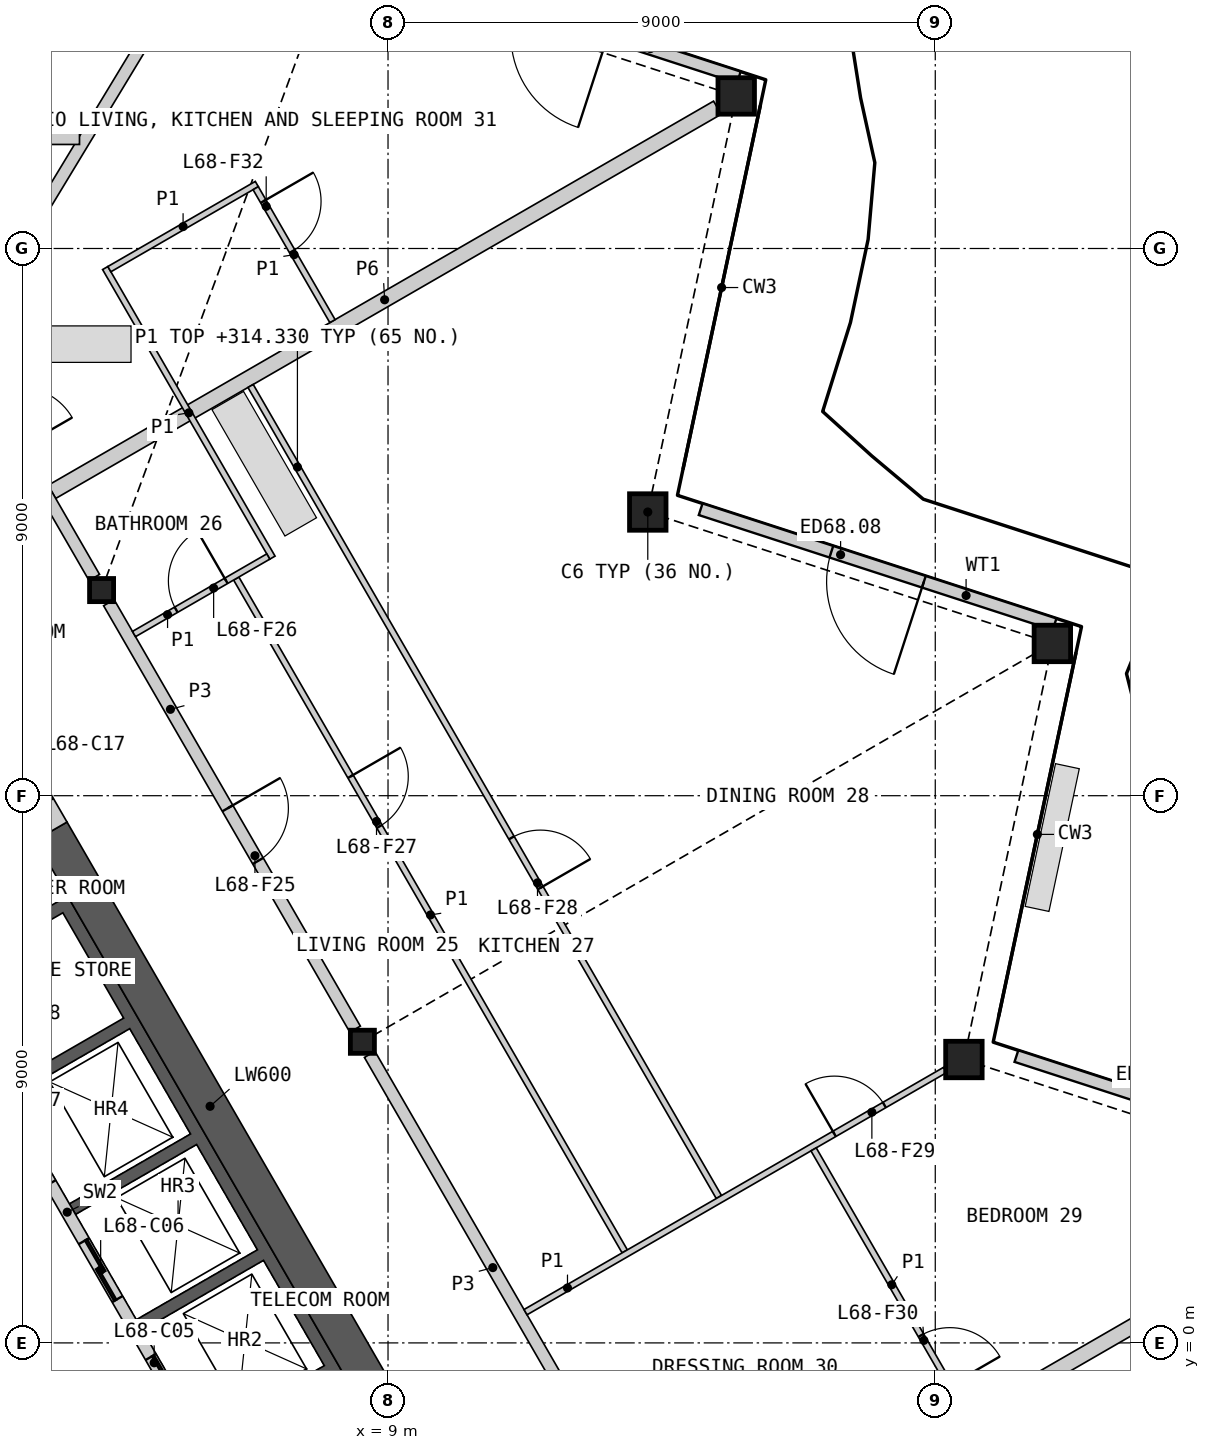
"""IFC4 building model, lengths in metres.
Left out: names, types, materials, properties, quantities, classifications, styles, units other than length and angle.
Written with IfcOpenShell. Run it as: python <this file> out.ifc"""

import sys

from ifc_helpers import new_model, si_unit, direction, frame, frame_2d, origin, origin_2d, place, context, subcontext, project, spatial, polyline, rectangle, hollow_rectangle, i_section, outline, extrude, element, fill, save


model = new_model("IFC4")
c1 = context("Model", 3, precision=1e-05, world=origin(), true_north=direction((0.0, 1.0)))
c2 = subcontext(c1, "Body", "Model", "MODEL_VIEW")
j1 = project(units=[si_unit("LENGTHUNIT", "METRE"), si_unit("PLANEANGLEUNIT", "RADIAN")], contexts=[c1])
p1 = place(None, origin())
s1 = spatial("IfcSite", under=j1, at=p1, CompositionType="ELEMENT")
p2 = place(p1, origin())
s2 = spatial("IfcBuilding", under=s1, at=p2, CompositionType="ELEMENT")
p3 = place(p2, frame((0.0, 0.0, 312.0)))
s3 = spatial("IfcBuildingStorey", under=s2, at=p3, CompositionType="ELEMENT", Elevation=312.0)
for number, where, z_axis, x_axis in (
    (1, (18.471, 4.661, 0.0), (0.0, 0.0, 1.0), (1.0, 0.0, 0.0)),
    (2, (19.926, 11.504, 0.0), (0.0, 0.0, 1.0), (1.0, 0.0, 0.0)),
    (3, (13.272, 13.666, 0.0), (0.0, 0.0, 1.0), (1.0, 0.0, 0.0)),
    (4, (14.727, 20.509, 0.0), (0.0, 0.0, 1.0), (1.0, 0.0, 0.0)),
):
    element("IfcColumn", number, at=place(p3, frame(where, z_axis=z_axis, x_axis=x_axis)), inside=s3, PredefinedType="COLUMN", context=c2, shape_type="SweptSolid", body=[
        extrude(hollow_rectangle(XDim=0.6, YDim=0.6, WallThickness=0.04, at=origin_2d()), origin(), (0.0, 0.0, 1.0), 3.4),
    ])
for number, where, z_axis, x_axis in (
    (5, (8.578, 4.953, 0.0), (0.0, 0.0, 1.0), (1.0, 0.0, 0.0)),
    (6, (4.289, 12.382, 0.0), (0.0, 0.0, 1.0), (1.0, 0.0, 0.0)),
):
    element("IfcColumn", number, at=place(p3, frame(where, z_axis=z_axis, x_axis=x_axis)), inside=s3, PredefinedType="COLUMN", context=c2, shape_type="SweptSolid", body=[
        extrude(i_section(OverallWidth=0.396, OverallDepth=0.381, WebThickness=0.019, FlangeThickness=0.03, at=origin_2d()), origin(), (0.0, 0.0, 1.0), 3.4),
    ])
p4 = place(p3, frame((25.155, 2.826, 0.0), z_axis=(0.0, 0.0, 1.0), x_axis=(-0.951053709789, 0.309025631781, 0.0)))
e7 = element("IfcWall", 7, at=p4, inside=s3, PredefinedType="SOLIDWALL", context=c2, shape_type="SweptSolid", body=[
    extrude(rectangle(XDim=6.12, YDim=0.2, at=frame_2d((3.06, 0.0))), origin(), (0.0, 0.0, 1.0), 2.488),
])
p5 = place(p4, frame((2.26, 0.0, 0.0)))
e8 = element("IfcOpeningElement", 8, at=p5, cuts=e7, PredefinedType="OPENING", context=c2, shape_type="SweptSolid", body=[
    extrude(rectangle(XDim=1.6, YDim=2.25, at=frame_2d((0.8, 1.125))), frame((0.0, 0.11, 0.0), z_axis=(0.0, -1.0, 0.0), x_axis=(1.0, 0.0, 0.0)), (0.0, 0.0, 1.0), 0.22),
])
p6 = place(p3, frame((19.962, 11.82, 0.0), z_axis=(0.0, 0.0, 1.0), x_axis=(-0.951053709789, 0.309025631781, 0.0)))
e9 = element("IfcWall", 9, at=p6, inside=s3, PredefinedType="SOLIDWALL", context=c2, shape_type="SweptSolid", body=[
    extrude(rectangle(XDim=6.12, YDim=0.2, at=frame_2d((3.06, 0.0))), origin(), (0.0, 0.0, 1.0), 2.488),
])
p7 = place(p6, frame((2.26, 0.0, 0.0)))
e10 = element("IfcOpeningElement", 10, at=p7, cuts=e9, PredefinedType="OPENING", context=c2, shape_type="SweptSolid", body=[
    extrude(rectangle(XDim=1.6, YDim=2.25, at=frame_2d((0.8, 1.125))), frame((0.0, 0.11, 0.0), z_axis=(0.0, -1.0, 0.0), x_axis=(1.0, 0.0, 0.0)), (0.0, 0.0, 1.0), 0.22),
])
p8 = place(p3, frame((14.769, 20.814, 0.0), z_axis=(0.0, 0.0, 1.0), x_axis=(-0.951069243123, 0.308977822483, 0.0)))
e11 = element("IfcWall", 11, at=p8, inside=s3, PredefinedType="SOLIDWALL", context=c2, shape_type="SweptSolid", body=[
    extrude(rectangle(XDim=6.12, YDim=0.2, at=frame_2d((3.06, 0.0))), origin(), (0.0, 0.0, 1.0), 2.488),
])
p9 = place(p8, frame((2.26, 0.0, 0.0)))
e12 = element("IfcOpeningElement", 12, at=p9, cuts=e11, PredefinedType="OPENING", context=c2, shape_type="SweptSolid", body=[
    extrude(rectangle(XDim=1.6, YDim=2.25, at=frame_2d((0.8, 1.125))), frame((0.0, 0.11, 0.0), z_axis=(0.0, -1.0, 0.0), x_axis=(1.0, 0.0, 0.0)), (0.0, 0.0, 1.0), 0.22),
])
p10 = place(p3, origin())
e13 = element("IfcWall", 13, at=p10, inside=s3, PredefinedType="SHEAR", context=c2, shape_type="SweptSolid", body=[
    extrude(outline(polyline([(1.561, 6.097), (3.731, 7.35), (8.231, -0.444), (6.061, -1.697), (5.96, -1.524), (7.952, -0.374), (6.952, 1.358), (4.96, 0.208), (4.861, 0.381), (6.852, 1.531), (5.852, 3.263), (3.861, 2.113), (3.76, 2.287), (5.752, 3.437), (4.752, 5.169), (2.76, 4.019), (2.66, 4.192), (4.652, 5.342), (3.652, 7.074), (1.66, 5.924), (1.561, 6.097)])), origin(), (0.0, 0.0, 1.0), 3.1),
])
p11 = place(p3, frame((5.817, -1.476, 0.0), z_axis=(0.0, 0.0, 1.0), x_axis=(-0.500002616675, 0.866023893041, 0.0)))
e14 = element("IfcWall", 14, at=p11, inside=s3, PredefinedType="SOLIDWALL", context=c2, shape_type="SweptSolid", body=[
    extrude(rectangle(XDim=8.373, YDim=0.2, at=frame_2d((4.187, 0.0))), origin(), (0.0, 0.0, 1.0), 3.1),
])
p12 = place(p11, frame((0.337, 0.0, 0.0)))
e15 = element("IfcOpeningElement", 15, at=p12, cuts=e14, PredefinedType="OPENING", context=c2, shape_type="SweptSolid", body=[
    extrude(rectangle(XDim=1.1, YDim=2.1, at=frame_2d((0.55, 1.05))), frame((0.0, 0.11, 0.0), z_axis=(0.0, -1.0, 0.0), x_axis=(1.0, 0.0, 0.0)), (0.0, 0.0, 1.0), 0.22),
])
p13 = place(p11, frame((2.537, 0.0, 0.0)))
e16 = element("IfcOpeningElement", 16, at=p13, cuts=e14, PredefinedType="OPENING", context=c2, shape_type="SweptSolid", body=[
    extrude(rectangle(XDim=1.1, YDim=2.1, at=frame_2d((0.55, 1.05))), frame((0.0, 0.11, 0.0), z_axis=(0.0, -1.0, 0.0), x_axis=(1.0, 0.0, 0.0)), (0.0, 0.0, 1.0), 0.22),
])
p14 = place(p11, frame((4.737, 0.0, 0.0)))
e17 = element("IfcOpeningElement", 17, at=p14, cuts=e14, PredefinedType="OPENING", context=c2, shape_type="SweptSolid", body=[
    extrude(rectangle(XDim=1.1, YDim=2.1, at=frame_2d((0.55, 1.05))), frame((0.0, 0.11, 0.0), z_axis=(0.0, -1.0, 0.0), x_axis=(1.0, 0.0, 0.0)), (0.0, 0.0, 1.0), 0.22),
])
p15 = place(p11, frame((7.037, 0.0, 0.0)))
e18 = element("IfcOpeningElement", 18, at=p15, cuts=e14, PredefinedType="OPENING", context=c2, shape_type="SweptSolid", body=[
    extrude(rectangle(XDim=0.9, YDim=2.1, at=frame_2d((0.45, 1.05))), frame((0.0, 0.11, 0.0), z_axis=(0.0, -1.0, 0.0), x_axis=(1.0, 0.0, 0.0)), (0.0, 0.0, 1.0), 0.22),
])
p16 = place(p3, frame((8.686, -0.634, 0.0), z_axis=(0.0, 0.0, 1.0), x_axis=(-0.50001836461, 0.866014800712, 0.0)))
e19 = element("IfcWall", 19, at=p16, inside=s3, PredefinedType="SHEAR", context=c2, shape_type="SweptSolid", body=[
    extrude(rectangle(XDim=10.451, YDim=0.6, at=frame_2d((5.225, 0.0))), origin(), (0.0, 0.0, 1.0), 3.1),
])
p17 = place(p3, frame((3.461, 8.417, 0.0), z_axis=(0.0, 0.0, 1.0), x_axis=(-0.499946605688, 0.86605622881, 0.0)))
e20 = element("IfcWall", 20, at=p17, inside=s3, PredefinedType="SHEAR", context=c2, shape_type="SweptSolid", body=[
    extrude(rectangle(XDim=2.2, YDim=0.6, at=frame_2d((1.1, 0.0))), origin(), (0.0, 0.0, 1.0), 3.1),
])
p18 = place(p17, frame((0.45, 0.0, 0.0)))
e21 = element("IfcOpeningElement", 21, at=p18, cuts=e20, PredefinedType="OPENING", context=c2, shape_type="SweptSolid", body=[
    extrude(rectangle(XDim=1.0, YDim=2.1, at=frame_2d((0.5, 1.05))), frame((0.0, 0.31, 0.0), z_axis=(0.0, -1.0, 0.0), x_axis=(1.0, 0.0, 0.0)), (0.0, 0.0, 1.0), 0.62),
])
p19 = place(p3, frame((3.472, 13.997, 0.0), z_axis=(0.0, 0.0, 1.0), x_axis=(0.866029233976, 0.499993365855, 0.0)))
e22 = element("IfcWall", 22, at=p19, inside=s3, PredefinedType="PARTITIONING", context=c2, shape_type="SweptSolid", body=[
    extrude(rectangle(XDim=12.637, YDim=0.25, at=frame_2d((6.319, 0.0))), origin(), (0.0, 0.0, 1.0), 2.33),
])
p20 = place(p3, frame((8.698, 4.745, 0.0), z_axis=(0.0, 0.0, 1.0), x_axis=(0.499984266882, -0.866034487114, 0.0)))
e23 = element("IfcWall", 23, at=p20, inside=s3, PredefinedType="PARTITIONING", context=c2, shape_type="SweptSolid", body=[
    extrude(rectangle(XDim=8.099, YDim=0.2, at=frame_2d((4.049, 0.0))), origin(), (0.0, 0.0, 1.0), 3.1),
])
p21 = place(p3, frame((4.409, 12.174, 0.0), z_axis=(0.0, 0.0, 1.0), x_axis=(0.499984266882, -0.866034487114, 0.0)))
e24 = element("IfcWall", 24, at=p21, inside=s3, PredefinedType="PARTITIONING", context=c2, shape_type="SweptSolid", body=[
    extrude(rectangle(XDim=8.099, YDim=0.2, at=frame_2d((4.049, 0.0))), origin(), (0.0, 0.0, 1.0), 3.1),
])
p22 = place(p21, frame((3.905, 0.0, 0.0)))
e25 = element("IfcOpeningElement", 25, at=p22, cuts=e24, PredefinedType="OPENING", context=c2, shape_type="SweptSolid", body=[
    extrude(rectangle(XDim=1.0, YDim=2.1, at=frame_2d((0.5, 1.05))), frame((0.0, 0.11, 0.0), z_axis=(0.0, -1.0, 0.0), x_axis=(1.0, 0.0, 0.0)), (0.0, 0.0, 1.0), 0.22),
])
p23 = place(p3, frame((18.454, -1.338, 0.0), z_axis=(0.0, 0.0, 1.0), x_axis=(0.866023407002, 0.500003458512, 0.0)))
e26 = element("IfcWall", 26, at=p23, inside=s3, PredefinedType="PARTITIONING", context=c2, shape_type="SweptSolid", body=[
    extrude(rectangle(XDim=7.345, YDim=0.25, at=frame_2d((3.673, 0.0))), origin(), (0.0, 0.0, 1.0), 2.33),
])
p24 = place(p3, frame((1.913, 16.498, 0.0), z_axis=(0.0, 0.0, 1.0), x_axis=(0.499950370306, -0.866054055606, 0.0)))
e27 = element("IfcWall", 27, at=p24, inside=s3, PredefinedType="PARTITIONING", context=c2, shape_type="SweptSolid", body=[
    extrude(rectangle(XDim=4.513, YDim=0.2, at=frame_2d((2.256, 0.0))), origin(), (0.0, 0.0, 1.0), 3.1),
])
p25 = place(p24, frame((1.053, 0.0, 0.0)))
e28 = element("IfcOpeningElement", 28, at=p25, cuts=e27, PredefinedType="OPENING", context=c2, shape_type="SweptSolid", body=[
    extrude(rectangle(XDim=1.0, YDim=2.1, at=frame_2d((0.5, 1.05))), frame((0.0, 0.11, 0.0), z_axis=(0.0, -1.0, 0.0), x_axis=(1.0, 0.0, 0.0)), (0.0, 0.0, 1.0), 0.22),
])
p26 = place(p3, frame((2.015, 16.497, 0.0), z_axis=(0.0, 0.0, 1.0), x_axis=(0.517779253395, 0.855514257482, 0.0)))
e29 = element("IfcWall", 29, at=p26, inside=s3, PredefinedType="PARTITIONING", context=c2, shape_type="SweptSolid", body=[
    extrude(rectangle(XDim=14.854, YDim=0.2, at=frame_2d((7.427, 0.0))), origin(), (0.0, 0.0, 1.0), 2.33),
])
p27 = place(p3, frame((0.208, 19.811, 0.0), z_axis=(0.0, 0.0, 1.0), x_axis=(1.0, 0.0, 0.0)))
e30 = element("IfcWall", 30, at=p27, inside=s3, PredefinedType="PARTITIONING", context=c2, shape_type="SweptSolid", body=[
    extrude(rectangle(XDim=3.718, YDim=0.2, at=frame_2d((1.859, 0.0))), origin(), (0.0, 0.0, 1.0), 2.33),
])
p28 = place(p3, frame((6.74, 15.739, 0.0), z_axis=(0.0, 0.0, 1.0), x_axis=(0.499995022685, -0.86602827742, 0.0)))
e31 = element("IfcWall", 31, at=p28, inside=s3, PredefinedType="PARTITIONING", context=c2, shape_type="SweptSolid", body=[
    extrude(rectangle(XDim=15.404, YDim=0.1, at=frame_2d((7.702, 0.0))), origin(), (0.0, 0.0, 1.0), 2.33),
])
p29 = place(p28, frame((8.582, 0.0, 0.0)))
e32 = element("IfcOpeningElement", 32, at=p29, cuts=e31, PredefinedType="OPENING", context=c2, shape_type="SweptSolid", body=[
    extrude(rectangle(XDim=0.95, YDim=2.1, at=frame_2d((0.475, 1.05))), frame((0.0, 0.06, 0.0), z_axis=(0.0, -1.0, 0.0), x_axis=(1.0, 0.0, 0.0)), (0.0, 0.0, 1.0), 0.12),
])
p30 = place(p3, frame((6.504, 12.572, 0.0), z_axis=(0.0, 0.0, 1.0), x_axis=(0.499998094172, -0.866026504112, 0.0)))
e33 = element("IfcWall", 33, at=p30, inside=s3, PredefinedType="PARTITIONING", context=c2, shape_type="SweptSolid", body=[
    extrude(rectangle(XDim=12.778, YDim=0.1, at=frame_2d((6.389, 0.0))), origin(), (0.0, 0.0, 1.0), 2.33),
])
p31 = place(p30, frame((3.759, 0.0, 0.0)))
e34 = element("IfcOpeningElement", 34, at=p31, cuts=e33, PredefinedType="OPENING", context=c2, shape_type="SweptSolid", body=[
    extrude(rectangle(XDim=0.95, YDim=2.1, at=frame_2d((0.475, 1.05))), frame((0.0, 0.06, 0.0), z_axis=(0.0, -1.0, 0.0), x_axis=(1.0, 0.0, 0.0)), (0.0, 0.0, 1.0), 0.12),
])
p32 = place(p3, frame((11.261, 0.506, 0.0), z_axis=(0.0, 0.0, 1.0), x_axis=(0.866024323732, 0.500001870701, 0.0)))
e35 = element("IfcWall", 35, at=p32, inside=s3, PredefinedType="PARTITIONING", context=c2, shape_type="SweptSolid", body=[
    extrude(rectangle(XDim=7.967, YDim=0.1, at=frame_2d((3.983, 0.0))), origin(), (0.0, 0.0, 1.0), 2.33),
])
p33 = place(p32, frame((5.865, 0.0, 0.0)))
e36 = element("IfcOpeningElement", 36, at=p33, cuts=e35, PredefinedType="OPENING", context=c2, shape_type="SweptSolid", body=[
    extrude(rectangle(XDim=0.95, YDim=2.1, at=frame_2d((0.475, 1.05))), frame((0.0, 0.06, 0.0), z_axis=(0.0, -1.0, 0.0), x_axis=(1.0, 0.0, 0.0)), (0.0, 0.0, 1.0), 0.12),
])
p34 = place(p3, frame((4.349, 17.679, 0.0), z_axis=(0.0, 0.0, 1.0), x_axis=(0.49997732567, -0.866038494419, 0.0)))
e37 = element("IfcWall", 37, at=p34, inside=s3, PredefinedType="PARTITIONING", context=c2, shape_type="SweptSolid", body=[
    extrude(rectangle(XDim=5.5, YDim=0.1, at=frame_2d((2.75, 0.0))), origin(), (0.0, 0.0, 1.0), 2.33),
])
p35 = place(p3, frame((15.999, 3.183, 0.0), z_axis=(0.0, 0.0, 1.0), x_axis=(0.500014207086, -0.866017201164, 0.0)))
e38 = element("IfcWall", 38, at=p35, inside=s3, PredefinedType="PARTITIONING", context=c2, shape_type="SweptSolid", body=[
    extrude(rectangle(XDim=5.143, YDim=0.1, at=frame_2d((2.571, 0.0))), origin(), (0.0, 0.0, 1.0), 2.33),
])
p36 = place(p35, frame((3.532, 0.0, 0.0)))
e39 = element("IfcOpeningElement", 39, at=p36, cuts=e38, PredefinedType="OPENING", context=c2, shape_type="SweptSolid", body=[
    extrude(rectangle(XDim=0.95, YDim=2.1, at=frame_2d((0.475, 1.05))), frame((0.0, 0.06, 0.0), z_axis=(0.0, -1.0, 0.0), x_axis=(1.0, 0.0, 0.0)), (0.0, 0.0, 1.0), 0.12),
])
p37 = place(p3, frame((4.417, 17.66, 0.0), z_axis=(0.0, 0.0, 1.0), x_axis=(0.866034573852, 0.49998411664, 0.0)))
e40 = element("IfcWall", 40, at=p37, inside=s3, PredefinedType="PARTITIONING", context=c2, shape_type="SweptSolid", body=[
    extrude(rectangle(XDim=2.8, YDim=0.1, at=frame_2d((1.4, 0.0))), origin(), (0.0, 0.0, 1.0), 2.33),
])
p38 = place(p3, frame((6.824, 18.992, 0.0), z_axis=(0.0, 0.0, 1.0), x_axis=(0.50001820224, -0.866014894461, 0.0)))
e41 = element("IfcWall", 41, at=p38, inside=s3, PredefinedType="PARTITIONING", context=c2, shape_type="SweptSolid", body=[
    extrude(rectangle(XDim=2.525, YDim=0.1, at=frame_2d((1.262, 0.0))), origin(), (0.0, 0.0, 1.0), 2.33),
])
p39 = place(p38, frame((0.25, 0.0, 0.0)))
e42 = element("IfcOpeningElement", 42, at=p39, cuts=e41, PredefinedType="OPENING", context=c2, shape_type="SweptSolid", body=[
    extrude(rectangle(XDim=0.95, YDim=2.1, at=frame_2d((0.475, 1.05))), frame((0.0, 0.06, 0.0), z_axis=(0.0, -1.0, 0.0), x_axis=(1.0, 0.0, 0.0)), (0.0, 0.0, 1.0), 0.12),
])
p40 = place(p3, frame((4.822, 11.659, 0.0), z_axis=(0.0, 0.0, 1.0), x_axis=(0.866030925526, 0.499990435942, 0.0)))
e43 = element("IfcWall", 43, at=p40, inside=s3, PredefinedType="PARTITIONING", context=c2, shape_type="SweptSolid", body=[
    extrude(rectangle(XDim=2.55, YDim=0.1, at=frame_2d((1.275, 0.0))), origin(), (0.0, 0.0, 1.0), 2.33),
])
p41 = place(p40, frame((0.8, 0.0, 0.0)))
e44 = element("IfcOpeningElement", 44, at=p41, cuts=e43, PredefinedType="OPENING", context=c2, shape_type="SweptSolid", body=[
    extrude(rectangle(XDim=0.95, YDim=2.1, at=frame_2d((0.475, 1.05))), frame((0.0, 0.06, 0.0), z_axis=(0.0, -1.0, 0.0), x_axis=(1.0, 0.0, 0.0)), (0.0, 0.0, 1.0), 0.12),
])
p42 = place(p7, origin())
e45 = element("IfcDoor", 45, at=p42, inside=s3, OperationType="DOUBLE_DOOR_SINGLE_SWING", PredefinedType="DOOR", context=c2, shape_type="SweptSolid", body=[
    extrude(rectangle(XDim=1.6, YDim=2.25, at=frame_2d((0.8, 1.125))), frame((0.0, 0.025, 0.0), z_axis=(0.0, -1.0, 0.0), x_axis=(1.0, 0.0, 0.0)), (0.0, 0.0, 1.0), 0.05),
])
fill(e10, e45)
p43 = place(p12, origin())
e46 = element("IfcDoor", 46, at=p43, inside=s3, OperationType="SLIDING_TO_LEFT", PredefinedType="DOOR", context=c2, shape_type="SweptSolid", body=[
    extrude(rectangle(XDim=1.1, YDim=2.1, at=frame_2d((0.55, 1.05))), frame((0.0, 0.025, 0.0), z_axis=(0.0, -1.0, 0.0), x_axis=(1.0, 0.0, 0.0)), (0.0, 0.0, 1.0), 0.05),
])
fill(e15, e46)
p44 = place(p13, origin())
e47 = element("IfcDoor", 47, at=p44, inside=s3, OperationType="SLIDING_TO_LEFT", PredefinedType="DOOR", context=c2, shape_type="SweptSolid", body=[
    extrude(rectangle(XDim=1.1, YDim=2.1, at=frame_2d((0.55, 1.05))), frame((0.0, 0.025, 0.0), z_axis=(0.0, -1.0, 0.0), x_axis=(1.0, 0.0, 0.0)), (0.0, 0.0, 1.0), 0.05),
])
fill(e16, e47)
p45 = place(p22, origin())
e48 = element("IfcDoor", 48, at=p45, inside=s3, OperationType="SINGLE_SWING_LEFT", PredefinedType="DOOR", context=c2, shape_type="SweptSolid", body=[
    extrude(rectangle(XDim=1.0, YDim=2.1, at=frame_2d((0.5, 1.05))), frame((0.0, 0.025, 0.0), z_axis=(0.0, -1.0, 0.0), x_axis=(1.0, 0.0, 0.0)), (0.0, 0.0, 1.0), 0.05),
])
fill(e25, e48)
p46 = place(p41, origin())
e49 = element("IfcDoor", 49, at=p46, inside=s3, OperationType="SINGLE_SWING_RIGHT", PredefinedType="DOOR", context=c2, shape_type="SweptSolid", body=[
    extrude(rectangle(XDim=0.95, YDim=2.1, at=frame_2d((0.475, 1.05))), frame((0.0, 0.025, 0.0), z_axis=(0.0, -1.0, 0.0), x_axis=(1.0, 0.0, 0.0)), (0.0, 0.0, 1.0), 0.05),
])
fill(e44, e49)
p47 = place(p31, origin())
e50 = element("IfcDoor", 50, at=p47, inside=s3, OperationType="SINGLE_SWING_LEFT", PredefinedType="DOOR", context=c2, shape_type="SweptSolid", body=[
    extrude(rectangle(XDim=0.95, YDim=2.1, at=frame_2d((0.475, 1.05))), frame((0.0, 0.025, 0.0), z_axis=(0.0, -1.0, 0.0), x_axis=(1.0, 0.0, 0.0)), (0.0, 0.0, 1.0), 0.05),
])
fill(e34, e50)
p48 = place(p29, origin())
e51 = element("IfcDoor", 51, at=p48, inside=s3, OperationType="SINGLE_SWING_RIGHT", PredefinedType="DOOR", context=c2, shape_type="SweptSolid", body=[
    extrude(rectangle(XDim=0.95, YDim=2.1, at=frame_2d((0.475, 1.05))), frame((0.0, 0.025, 0.0), z_axis=(0.0, -1.0, 0.0), x_axis=(1.0, 0.0, 0.0)), (0.0, 0.0, 1.0), 0.05),
])
fill(e32, e51)
p49 = place(p33, origin())
e52 = element("IfcDoor", 52, at=p49, inside=s3, OperationType="SINGLE_SWING_LEFT", PredefinedType="DOOR", context=c2, shape_type="SweptSolid", body=[
    extrude(rectangle(XDim=0.95, YDim=2.1, at=frame_2d((0.475, 1.05))), frame((0.0, 0.025, 0.0), z_axis=(0.0, -1.0, 0.0), x_axis=(1.0, 0.0, 0.0)), (0.0, 0.0, 1.0), 0.05),
])
fill(e36, e52)
p50 = place(p36, origin())
e53 = element("IfcDoor", 53, at=p50, inside=s3, OperationType="SINGLE_SWING_RIGHT", PredefinedType="DOOR", context=c2, shape_type="SweptSolid", body=[
    extrude(rectangle(XDim=0.95, YDim=2.1, at=frame_2d((0.475, 1.05))), frame((0.0, 0.025, 0.0), z_axis=(0.0, -1.0, 0.0), x_axis=(1.0, 0.0, 0.0)), (0.0, 0.0, 1.0), 0.05),
])
fill(e39, e53)
p51 = place(p39, origin())
e54 = element("IfcDoor", 54, at=p51, inside=s3, OperationType="SINGLE_SWING_LEFT", PredefinedType="DOOR", context=c2, shape_type="SweptSolid", body=[
    extrude(rectangle(XDim=0.95, YDim=2.1, at=frame_2d((0.475, 1.05))), frame((0.0, 0.025, 0.0), z_axis=(0.0, -1.0, 0.0), x_axis=(1.0, 0.0, 0.0)), (0.0, 0.0, 1.0), 0.05),
])
fill(e42, e54)
save(model, sys.argv[1])
